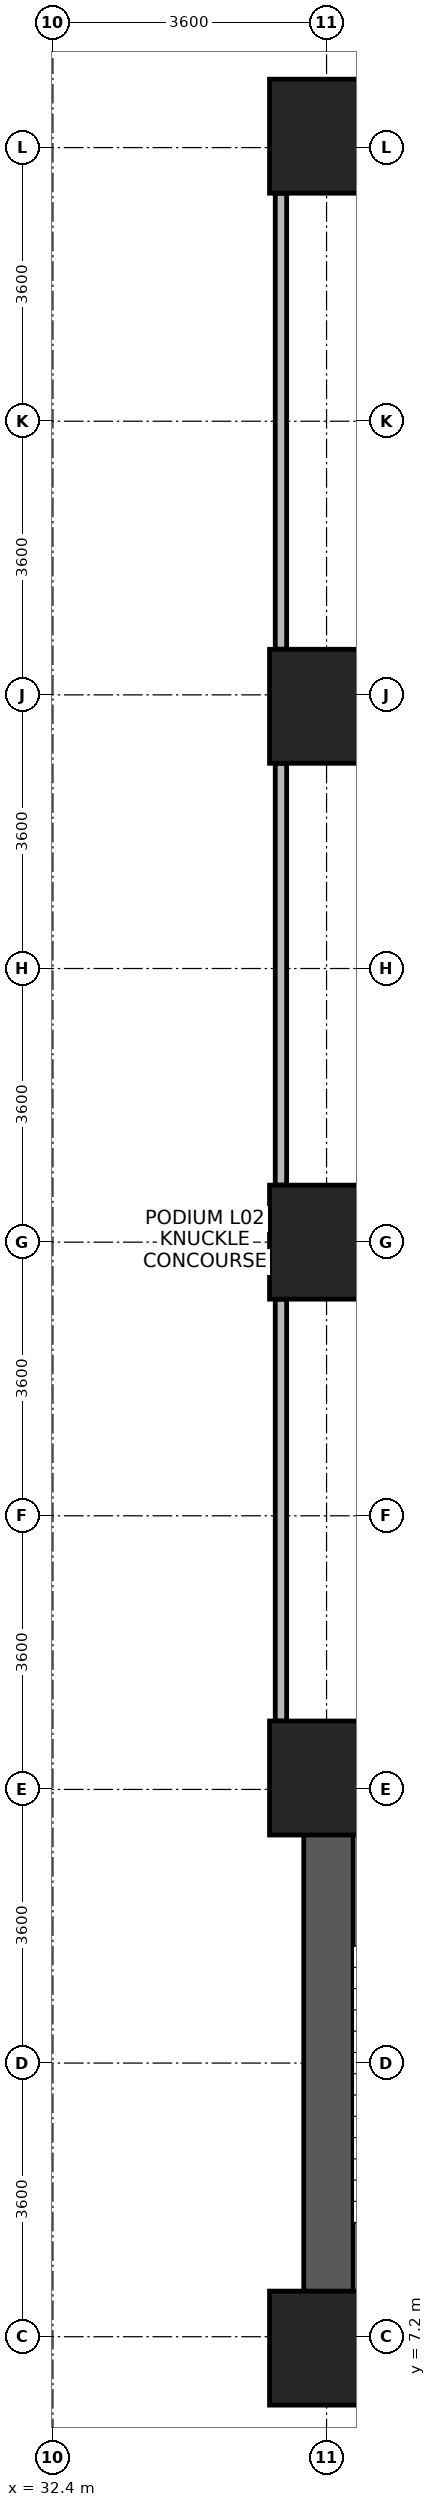
"""IFC4 building model, lengths in metres.
Left out: names, types, materials, properties, quantities, classifications, styles, units other than length and angle.
Written with IfcOpenShell. Run it as: python <this file> out.ifc"""

import sys

from ifc_helpers import new_model, si_unit, direction, frame, frame_2d, origin, origin_2d, place, context, subcontext, project, spatial, rectangle, extrude, source, transform, mapped, element, save


model = new_model("IFC4")
c1 = context("Model", 3, precision=1e-05, world=origin(), true_north=direction((0.0, 1.0)))
c2 = subcontext(c1, "Body", "Model", "MODEL_VIEW")
j1 = project(units=[si_unit("LENGTHUNIT", "METRE"), si_unit("PLANEANGLEUNIT", "RADIAN")], contexts=[c1])
p1 = place(None, origin())
s1 = spatial("IfcSite", under=j1, at=p1, CompositionType="ELEMENT")
p2 = place(p1, origin())
s2 = spatial("IfcBuilding", under=s1, at=p2, CompositionType="ELEMENT")
p3 = place(p2, frame((0.0, 0.0, 10.2)))
s3 = spatial("IfcBuildingStorey", under=s2, at=p3, CompositionType="ELEMENT", Elevation=10.2)
p4 = place(p3, frame((36.025, 6.65, 0.0), z_axis=(0.0, 0.0, 1.0), x_axis=(0.0, 1.0, 0.0)))
e1 = element("IfcWall", 1, at=p4, inside=s3, PredefinedType="SHEAR", context=c2, shape_type="SweptSolid", body=[
    extrude(rectangle(XDim=8.3, YDim=0.65, at=frame_2d((4.15, 0.0))), origin(), (0.0, 0.0, 1.0), 4.52),
])
for number, where, z_axis, x_axis in (
    (2, (36.35, 6.975, 0.0), (0.0, 0.0, 1.0), (1.0, 0.0, 0.0)),
    (3, (36.35, 14.625, 0.0), (0.0, 0.0, 1.0), (1.0, 0.0, 0.0)),
):
    element("IfcWall", number, at=place(p3, frame(where, z_axis=z_axis, x_axis=x_axis)), inside=s3, PredefinedType="SHEAR", context=c2, shape_type="SweptSolid", body=[
        extrude(rectangle(XDim=3.2, YDim=0.65, at=frame_2d((1.6, 0.0))), origin(), (0.0, 0.0, 1.0), 4.52),
    ])
m1 = source(origin(), c2, "Body", "SweptSolid", [
    extrude(rectangle(XDim=1.5, YDim=1.5, at=origin_2d()), origin(), (0.0, 0.0, 1.0), 4.8),
])
for number, where, z_axis, x_axis in (
    (4, (36.0, 21.6, 0.0), (0.0, 0.0, 1.0), (1.0, 0.0, 0.0)),
    (5, (36.0, 28.65, 0.0), (0.0, 0.0, 1.0), (1.0, 0.0, 0.0)),
    (6, (36.0, 36.15, 0.0), (0.0, 0.0, 1.0), (1.0, 0.0, 0.0)),
    (7, (36.0, 7.05, 0.0), (0.0, 0.0, 1.0), (1.0, 0.0, 0.0)),
    (8, (36.0, 14.55, 0.0), (0.0, 0.0, 1.0), (1.0, 0.0, 0.0)),
):
    element("IfcColumn", number, at=place(p3, frame(where, z_axis=z_axis, x_axis=x_axis)), inside=s3, PredefinedType="COLUMN", context=c2, shape_type="MappedRepresentation", body=[
        mapped(m1, transform((0.0, 0.0, 0.0), x_axis=(1.0, 0.0, 0.0), y_axis=(0.0, 1.0, 0.0), z_axis=(0.0, 0.0, 1.0), scale=1.0)),
    ])
p5 = place(p3, frame((35.4, 15.3, 0.0), z_axis=(0.0, 0.0, 1.0), x_axis=(0.0, 1.0, 0.0)))
e9 = element("IfcWall", 9, at=p5, inside=s3, PredefinedType="PARTITIONING", context=c2, shape_type="SweptSolid", body=[
    extrude(rectangle(XDim=5.55, YDim=0.15, at=frame_2d((2.775, 0.0))), origin(), (0.0, 0.0, 1.0), 4.5),
])
p6 = place(p3, frame((35.4, 22.35, 0.0), z_axis=(0.0, 0.0, 1.0), x_axis=(0.0, 1.0, 0.0)))
e10 = element("IfcWall", 10, at=p6, inside=s3, PredefinedType="PARTITIONING", context=c2, shape_type="SweptSolid", body=[
    extrude(rectangle(XDim=5.55, YDim=0.15, at=frame_2d((2.775, 0.0))), origin(), (0.0, 0.0, 1.0), 4.5),
])
p7 = place(p3, frame((35.4, 29.4, 0.0), z_axis=(0.0, 0.0, 1.0), x_axis=(0.0, 1.0, 0.0)))
e11 = element("IfcWall", 11, at=p7, inside=s3, PredefinedType="PARTITIONING", context=c2, shape_type="SweptSolid", body=[
    extrude(rectangle(XDim=6.0, YDim=0.15, at=frame_2d((3.0, 0.0))), origin(), (0.0, 0.0, 1.0), 4.5),
])
save(model, sys.argv[1])
